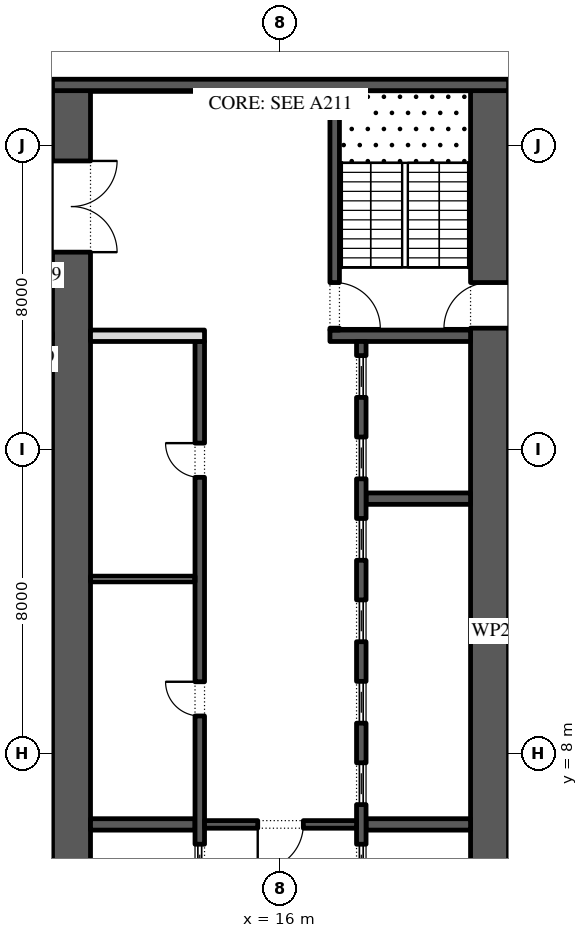
"""IFC4 building model, lengths in metres.
Left out: names, types, materials, properties, quantities, classifications, styles, units other than length and angle.
Written with IfcOpenShell. Run it as: python <this file> out.ifc"""

import sys

from ifc_helpers import new_model, si_unit, direction, frame, frame_2d, origin, place, context, subcontext, project, spatial, rectangle, extrude, element, fill, save


model = new_model("IFC4")
c1 = context("Model", 3, precision=1e-05, world=origin(), true_north=direction((0.0, 1.0)))
c2 = subcontext(c1, "Body", "Model", "MODEL_VIEW")
j1 = project(units=[si_unit("LENGTHUNIT", "METRE"), si_unit("PLANEANGLEUNIT", "RADIAN")], contexts=[c1])
p1 = place(None, origin())
s1 = spatial("IfcSite", under=j1, at=p1, CompositionType="ELEMENT")
p2 = place(p1, origin())
s2 = spatial("IfcBuilding", under=s1, at=p2, CompositionType="ELEMENT")
p3 = place(p2, frame((0.0, 0.0, 43.8)))
s3 = spatial("IfcBuildingStorey", under=s2, at=p3, CompositionType="ELEMENT", Elevation=43.8)
p4 = place(p3, frame((21.5, -2.45, 0.0), z_axis=(0.0, 0.0, 1.0), x_axis=(0.0, 1.0, 0.0)))
e1 = element("IfcWall", 1, at=p4, inside=s3, PredefinedType="SHEAR", context=c2, shape_type="SweptSolid", body=[
    extrude(rectangle(XDim=27.9, YDim=1.0, at=frame_2d((13.95, 0.0))), origin(), (0.0, 0.0, 1.0), 4.0),
])
p5 = place(p4, frame((5.05, 0.0, 0.0)))
e2 = element("IfcOpeningElement", 2, at=p5, cuts=e1, PredefinedType="OPENING", context=c2, shape_type="SweptSolid", body=[
    extrude(rectangle(XDim=1.2, YDim=2.1, at=frame_2d((0.6, 1.05))), frame((0.0, 0.51, 0.0), z_axis=(0.0, -1.0, 0.0), x_axis=(1.0, 0.0, 0.0)), (0.0, 0.0, 1.0), 1.02),
])
p6 = place(p4, frame((21.65, 0.0, 0.0)))
e3 = element("IfcOpeningElement", 3, at=p6, cuts=e1, PredefinedType="OPENING", context=c2, shape_type="SweptSolid", body=[
    extrude(rectangle(XDim=1.2, YDim=2.1, at=frame_2d((0.6, 1.05))), frame((0.0, 0.51, 0.0), z_axis=(0.0, -1.0, 0.0), x_axis=(1.0, 0.0, 0.0)), (0.0, 0.0, 1.0), 1.02),
])
p7 = place(p3, frame((10.5, -2.45, 0.0), z_axis=(0.0, 0.0, 1.0), x_axis=(0.0, 1.0, 0.0)))
e4 = element("IfcWall", 4, at=p7, inside=s3, PredefinedType="SHEAR", context=c2, shape_type="SweptSolid", body=[
    extrude(rectangle(XDim=27.9, YDim=1.0, at=frame_2d((13.95, 0.0))), origin(), (0.0, 0.0, 1.0), 4.0),
])
p8 = place(p7, frame((23.65, 0.0, 0.0)))
e5 = element("IfcOpeningElement", 5, at=p8, cuts=e4, PredefinedType="OPENING", context=c2, shape_type="SweptSolid", body=[
    extrude(rectangle(XDim=2.4, YDim=2.1, at=frame_2d((1.2, 1.05))), frame((0.0, 0.51, 0.0), z_axis=(0.0, -1.0, 0.0), x_axis=(1.0, 0.0, 0.0)), (0.0, 0.0, 1.0), 1.02),
])
p9 = place(p7, frame((1.387, 0.0, 0.0)))
e6 = element("IfcOpeningElement", 6, at=p9, cuts=e4, PredefinedType="OPENING", context=c2, shape_type="SweptSolid", body=[
    extrude(rectangle(XDim=0.9, YDim=2.1, at=frame_2d((0.45, 1.05))), frame((0.0, 0.51, 0.0), z_axis=(0.0, -1.0, 0.0), x_axis=(1.0, 0.0, 0.0)), (0.0, 0.0, 1.0), 1.02),
])
p10 = place(p7, frame((4.613, 0.0, 0.0)))
e7 = element("IfcOpeningElement", 7, at=p10, cuts=e4, PredefinedType="OPENING", context=c2, shape_type="SweptSolid", body=[
    extrude(rectangle(XDim=0.9, YDim=2.1, at=frame_2d((0.45, 1.05))), frame((0.0, 0.51, 0.0), z_axis=(0.0, -1.0, 0.0), x_axis=(1.0, 0.0, 0.0)), (0.0, 0.0, 1.0), 1.02),
])
p11 = place(p3, frame((10.0, 25.6, 0.0), z_axis=(0.0, 0.0, 1.0), x_axis=(1.0, 0.0, 0.0)))
e8 = element("IfcWall", 8, at=p11, inside=s3, PredefinedType="SHEAR", context=c2, shape_type="SweptSolid", body=[
    extrude(rectangle(XDim=12.0, YDim=0.3, at=frame_2d((6.0, 0.0))), origin(), (0.0, 0.0, 1.0), 4.0),
])
p12 = place(p3, frame((17.3, 19.0, 0.0), z_axis=(0.0, 0.0, 1.0), x_axis=(1.0, 0.0, 0.0)))
e9 = element("IfcWall", 9, at=p12, inside=s3, PredefinedType="SHEAR", context=c2, shape_type="SweptSolid", body=[
    extrude(rectangle(XDim=3.7, YDim=0.3, at=frame_2d((1.85, 0.0))), origin(), (0.0, 0.0, 1.0), 4.0),
])
p13 = place(p3, frame((17.425, 19.15, 0.0), z_axis=(0.0, 0.0, 1.0), x_axis=(0.0, 1.0, 0.0)))
e10 = element("IfcWall", 10, at=p13, inside=s3, PredefinedType="SHEAR", context=c2, shape_type="SweptSolid", body=[
    extrude(rectangle(XDim=6.3, YDim=0.25, at=frame_2d((3.15, 0.0))), origin(), (0.0, 0.0, 1.0), 4.0),
])
p14 = place(p13, frame((0.05, 0.0, 0.0)))
e11 = element("IfcOpeningElement", 11, at=p14, cuts=e10, PredefinedType="OPENING", context=c2, shape_type="SweptSolid", body=[
    extrude(rectangle(XDim=1.2, YDim=2.1, at=frame_2d((0.6, 1.05))), frame((0.0, 0.135, 0.0), z_axis=(0.0, -1.0, 0.0), x_axis=(1.0, 0.0, 0.0)), (0.0, 0.0, 1.0), 0.27),
])
for number, where, z_axis, x_axis in (
    (12, (18.25, 6.143, 0.0), (0.0, 0.0, 1.0), (1.0, 0.0, 0.0)),
    (13, (18.25, 14.714, 0.0), (0.0, 0.0, 1.0), (1.0, 0.0, 0.0)),
):
    element("IfcWall", number, at=place(p3, frame(where, z_axis=z_axis, x_axis=x_axis)), inside=s3, PredefinedType="SHEAR", context=c2, shape_type="SweptSolid", body=[
        extrude(rectangle(XDim=2.75, YDim=0.3, at=frame_2d((1.375, 0.0))), origin(), (0.0, 0.0, 1.0), 4.0),
    ])
p15 = place(p3, frame((18.125, 4.15, 0.0), z_axis=(0.0, 0.0, 1.0), x_axis=(0.0, 1.0, 0.0)))
e14 = element("IfcWall", 14, at=p15, inside=s3, PredefinedType="SHEAR", context=c2, shape_type="SweptSolid", body=[
    extrude(rectangle(XDim=14.7, YDim=0.25, at=frame_2d((7.35, 0.0))), origin(), (0.0, 0.0, 1.0), 4.0),
])
p16 = place(p15, frame((0.371, 0.0, 0.0)))
e15 = element("IfcOpeningElement", 15, at=p16, cuts=e14, PredefinedType="OPENING", context=c2, shape_type="SweptSolid", body=[
    extrude(rectangle(XDim=1.1, YDim=2.1, at=frame_2d((0.55, 1.05))), frame((0.0, 0.135, 0.0), z_axis=(0.0, -1.0, 0.0), x_axis=(1.0, 0.0, 0.0)), (0.0, 0.0, 1.0), 0.27),
])
p17 = place(p15, frame((2.514, 0.0, 0.0)))
e16 = element("IfcOpeningElement", 16, at=p17, cuts=e14, PredefinedType="OPENING", context=c2, shape_type="SweptSolid", body=[
    extrude(rectangle(XDim=1.1, YDim=2.1, at=frame_2d((0.55, 1.05))), frame((0.0, 0.135, 0.0), z_axis=(0.0, -1.0, 0.0), x_axis=(1.0, 0.0, 0.0)), (0.0, 0.0, 1.0), 0.27),
])
p18 = place(p15, frame((4.657, 0.0, 0.0)))
e17 = element("IfcOpeningElement", 17, at=p18, cuts=e14, PredefinedType="OPENING", context=c2, shape_type="SweptSolid", body=[
    extrude(rectangle(XDim=1.1, YDim=2.1, at=frame_2d((0.55, 1.05))), frame((0.0, 0.135, 0.0), z_axis=(0.0, -1.0, 0.0), x_axis=(1.0, 0.0, 0.0)), (0.0, 0.0, 1.0), 0.27),
])
p19 = place(p15, frame((6.8, 0.0, 0.0)))
e18 = element("IfcOpeningElement", 18, at=p19, cuts=e14, PredefinedType="OPENING", context=c2, shape_type="SweptSolid", body=[
    extrude(rectangle(XDim=1.1, YDim=2.1, at=frame_2d((0.55, 1.05))), frame((0.0, 0.135, 0.0), z_axis=(0.0, -1.0, 0.0), x_axis=(1.0, 0.0, 0.0)), (0.0, 0.0, 1.0), 0.27),
])
p20 = place(p15, frame((8.943, 0.0, 0.0)))
e19 = element("IfcOpeningElement", 19, at=p20, cuts=e14, PredefinedType="OPENING", context=c2, shape_type="SweptSolid", body=[
    extrude(rectangle(XDim=1.1, YDim=2.1, at=frame_2d((0.55, 1.05))), frame((0.0, 0.135, 0.0), z_axis=(0.0, -1.0, 0.0), x_axis=(1.0, 0.0, 0.0)), (0.0, 0.0, 1.0), 0.27),
])
p21 = place(p15, frame((11.086, 0.0, 0.0)))
e20 = element("IfcOpeningElement", 20, at=p21, cuts=e14, PredefinedType="OPENING", context=c2, shape_type="SweptSolid", body=[
    extrude(rectangle(XDim=1.1, YDim=2.1, at=frame_2d((0.55, 1.05))), frame((0.0, 0.135, 0.0), z_axis=(0.0, -1.0, 0.0), x_axis=(1.0, 0.0, 0.0)), (0.0, 0.0, 1.0), 0.27),
])
p22 = place(p15, frame((13.229, 0.0, 0.0)))
e21 = element("IfcOpeningElement", 21, at=p22, cuts=e14, PredefinedType="OPENING", context=c2, shape_type="SweptSolid", body=[
    extrude(rectangle(XDim=1.1, YDim=2.1, at=frame_2d((0.55, 1.05))), frame((0.0, 0.135, 0.0), z_axis=(0.0, -1.0, 0.0), x_axis=(1.0, 0.0, 0.0)), (0.0, 0.0, 1.0), 0.27),
])
p23 = place(p3, frame((11.0, 6.143, 0.0), z_axis=(0.0, 0.0, 1.0), x_axis=(1.0, 0.0, 0.0)))
e22 = element("IfcWall", 22, at=p23, inside=s3, PredefinedType="SHEAR", context=c2, shape_type="SweptSolid", body=[
    extrude(rectangle(XDim=2.75, YDim=0.3, at=frame_2d((1.375, 0.0))), origin(), (0.0, 0.0, 1.0), 4.0),
])
p24 = place(p3, frame((13.875, -2.45, 0.0), z_axis=(0.0, 0.0, 1.0), x_axis=(0.0, 1.0, 0.0)))
e23 = element("IfcWall", 23, at=p24, inside=s3, PredefinedType="SHEAR", context=c2, shape_type="SweptSolid", body=[
    extrude(rectangle(XDim=21.3, YDim=0.25, at=frame_2d((10.65, 0.0))), origin(), (0.0, 0.0, 1.0), 4.0),
])
p25 = place(p24, frame((11.446, 0.0, 0.0)))
e24 = element("IfcOpeningElement", 24, at=p25, cuts=e23, PredefinedType="OPENING", context=c2, shape_type="SweptSolid", body=[
    extrude(rectangle(XDim=0.9, YDim=2.1, at=frame_2d((0.45, 1.05))), frame((0.0, 0.135, 0.0), z_axis=(0.0, -1.0, 0.0), x_axis=(1.0, 0.0, 0.0)), (0.0, 0.0, 1.0), 0.27),
])
p26 = place(p24, frame((17.725, 0.0, 0.0)))
e25 = element("IfcOpeningElement", 25, at=p26, cuts=e23, PredefinedType="OPENING", context=c2, shape_type="SweptSolid", body=[
    extrude(rectangle(XDim=0.9, YDim=2.1, at=frame_2d((0.45, 1.05))), frame((0.0, 0.135, 0.0), z_axis=(0.0, -1.0, 0.0), x_axis=(1.0, 0.0, 0.0)), (0.0, 0.0, 1.0), 0.27),
])
p27 = place(p24, frame((6.971, 0.0, 0.0)))
e26 = element("IfcOpeningElement", 26, at=p27, cuts=e23, PredefinedType="OPENING", context=c2, shape_type="SweptSolid", body=[
    extrude(rectangle(XDim=1.1, YDim=2.1, at=frame_2d((0.55, 1.05))), frame((0.0, 0.135, 0.0), z_axis=(0.0, -1.0, 0.0), x_axis=(1.0, 0.0, 0.0)), (0.0, 0.0, 1.0), 0.27),
])
p28 = place(p3, frame((11.0, 19.0, 0.0), z_axis=(0.0, 0.0, 1.0), x_axis=(1.0, 0.0, 0.0)))
e27 = element("IfcWall", 27, at=p28, inside=s3, PredefinedType="PARTITIONING", context=c2, shape_type="SweptSolid", body=[
    extrude(rectangle(XDim=3.0, YDim=0.3, at=frame_2d((1.5, 0.0))), origin(), (0.0, 0.0, 1.0), 4.0),
])
p29 = place(p3, frame((11.0, 12.6, 0.0), z_axis=(0.0, 0.0, 1.0), x_axis=(1.0, 0.0, 0.0)))
e28 = element("IfcWall", 28, at=p29, inside=s3, PredefinedType="PARTITIONING", context=c2, shape_type="SweptSolid", body=[
    extrude(rectangle(XDim=2.75, YDim=0.15, at=frame_2d((1.375, 0.0))), origin(), (0.0, 0.0, 1.0), 4.0),
])
p30 = place(p3, frame((14.0, 6.143, 0.0), z_axis=(0.0, 0.0, 1.0), x_axis=(1.0, 0.0, 0.0)))
e29 = element("IfcWall", 29, at=p30, inside=s3, PredefinedType="SHEAR", context=c2, shape_type="SweptSolid", body=[
    extrude(rectangle(XDim=4.0, YDim=0.2, at=frame_2d((2.0, 0.0))), origin(), (0.0, 0.0, 1.0), 4.0),
])
p31 = place(p30, frame((1.4, 0.0, 0.0)))
e30 = element("IfcOpeningElement", 30, at=p31, cuts=e29, PredefinedType="OPENING", context=c2, shape_type="SweptSolid", body=[
    extrude(rectangle(XDim=1.2, YDim=2.1, at=frame_2d((0.6, 1.05))), frame((0.0, 0.11, 0.0), z_axis=(0.0, -1.0, 0.0), x_axis=(1.0, 0.0, 0.0)), (0.0, 0.0, 1.0), 0.22),
])
p32 = place(p16, origin())
e31 = element("IfcDoor", 31, at=p32, inside=s3, OperationType="SLIDING_TO_LEFT", PredefinedType="DOOR", context=c2, shape_type="SweptSolid", body=[
    extrude(rectangle(XDim=1.1, YDim=2.1, at=frame_2d((0.55, 1.05))), frame((0.0, 0.025, 0.0), z_axis=(0.0, -1.0, 0.0), x_axis=(1.0, 0.0, 0.0)), (0.0, 0.0, 1.0), 0.05),
])
fill(e15, e31)
p33 = place(p17, origin())
e32 = element("IfcDoor", 32, at=p33, inside=s3, OperationType="SLIDING_TO_LEFT", PredefinedType="DOOR", context=c2, shape_type="SweptSolid", body=[
    extrude(rectangle(XDim=1.1, YDim=2.1, at=frame_2d((0.55, 1.05))), frame((0.0, 0.025, 0.0), z_axis=(0.0, -1.0, 0.0), x_axis=(1.0, 0.0, 0.0)), (0.0, 0.0, 1.0), 0.05),
])
fill(e16, e32)
p34 = place(p18, origin())
e33 = element("IfcDoor", 33, at=p34, inside=s3, OperationType="SLIDING_TO_LEFT", PredefinedType="DOOR", context=c2, shape_type="SweptSolid", body=[
    extrude(rectangle(XDim=1.1, YDim=2.1, at=frame_2d((0.55, 1.05))), frame((0.0, 0.025, 0.0), z_axis=(0.0, -1.0, 0.0), x_axis=(1.0, 0.0, 0.0)), (0.0, 0.0, 1.0), 0.05),
])
fill(e17, e33)
p35 = place(p19, origin())
e34 = element("IfcDoor", 34, at=p35, inside=s3, OperationType="SLIDING_TO_LEFT", PredefinedType="DOOR", context=c2, shape_type="SweptSolid", body=[
    extrude(rectangle(XDim=1.1, YDim=2.1, at=frame_2d((0.55, 1.05))), frame((0.0, 0.025, 0.0), z_axis=(0.0, -1.0, 0.0), x_axis=(1.0, 0.0, 0.0)), (0.0, 0.0, 1.0), 0.05),
])
fill(e18, e34)
p36 = place(p20, origin())
e35 = element("IfcDoor", 35, at=p36, inside=s3, OperationType="SLIDING_TO_LEFT", PredefinedType="DOOR", context=c2, shape_type="SweptSolid", body=[
    extrude(rectangle(XDim=1.1, YDim=2.1, at=frame_2d((0.55, 1.05))), frame((0.0, 0.025, 0.0), z_axis=(0.0, -1.0, 0.0), x_axis=(1.0, 0.0, 0.0)), (0.0, 0.0, 1.0), 0.05),
])
fill(e19, e35)
p37 = place(p21, origin())
e36 = element("IfcDoor", 36, at=p37, inside=s3, OperationType="SLIDING_TO_LEFT", PredefinedType="DOOR", context=c2, shape_type="SweptSolid", body=[
    extrude(rectangle(XDim=1.1, YDim=2.1, at=frame_2d((0.55, 1.05))), frame((0.0, 0.025, 0.0), z_axis=(0.0, -1.0, 0.0), x_axis=(1.0, 0.0, 0.0)), (0.0, 0.0, 1.0), 0.05),
])
fill(e20, e36)
p38 = place(p22, origin())
e37 = element("IfcDoor", 37, at=p38, inside=s3, OperationType="SLIDING_TO_LEFT", PredefinedType="DOOR", context=c2, shape_type="SweptSolid", body=[
    extrude(rectangle(XDim=1.1, YDim=2.1, at=frame_2d((0.55, 1.05))), frame((0.0, 0.025, 0.0), z_axis=(0.0, -1.0, 0.0), x_axis=(1.0, 0.0, 0.0)), (0.0, 0.0, 1.0), 0.05),
])
fill(e21, e37)
p39 = place(p25, origin())
e38 = element("IfcDoor", 38, at=p39, inside=s3, OperationType="SINGLE_SWING_LEFT", PredefinedType="DOOR", context=c2, shape_type="SweptSolid", body=[
    extrude(rectangle(XDim=0.9, YDim=2.1, at=frame_2d((0.45, 1.05))), frame((0.0, 0.125, 0.0), z_axis=(0.0, -1.0, 0.0), x_axis=(1.0, 0.0, 0.0)), (0.0, 0.0, 1.0), 0.05),
])
fill(e24, e38)
p40 = place(p26, origin())
e39 = element("IfcDoor", 39, at=p40, inside=s3, OperationType="SINGLE_SWING_LEFT", PredefinedType="DOOR", context=c2, shape_type="SweptSolid", body=[
    extrude(rectangle(XDim=0.9, YDim=2.1, at=frame_2d((0.45, 1.05))), frame((0.0, 0.125, 0.0), z_axis=(0.0, -1.0, 0.0), x_axis=(1.0, 0.0, 0.0)), (0.0, 0.0, 1.0), 0.05),
])
fill(e25, e39)
p41 = place(p27, origin())
e40 = element("IfcDoor", 40, at=p41, inside=s3, OperationType="SLIDING_TO_LEFT", PredefinedType="DOOR", context=c2, shape_type="SweptSolid", body=[
    extrude(rectangle(XDim=1.1, YDim=2.1, at=frame_2d((0.55, 1.05))), frame((0.0, 0.025, 0.0), z_axis=(0.0, -1.0, 0.0), x_axis=(1.0, 0.0, 0.0)), (0.0, 0.0, 1.0), 0.05),
])
fill(e26, e40)
p42 = place(p31, frame((1.2, 0.0, 0.0), z_axis=(0.0, 0.0, 1.0), x_axis=(-1.0, 0.0, 0.0)))
e41 = element("IfcDoor", 41, at=p42, inside=s3, OperationType="SINGLE_SWING_LEFT", PredefinedType="DOOR", context=c2, shape_type="SweptSolid", body=[
    extrude(rectangle(XDim=1.2, YDim=2.1, at=frame_2d((0.6, 1.05))), frame((0.0, 0.025, 0.0), z_axis=(0.0, -1.0, 0.0), x_axis=(1.0, 0.0, 0.0)), (0.0, 0.0, 1.0), 0.05),
])
fill(e30, e41)
p43 = place(p8, frame((2.4, 0.0, 0.0), z_axis=(0.0, 0.0, 1.0), x_axis=(-1.0, 0.0, 0.0)))
e42 = element("IfcDoor", 42, at=p43, inside=s3, OperationType="DOUBLE_DOOR_SINGLE_SWING", PredefinedType="DOOR", context=c2, shape_type="SweptSolid", body=[
    extrude(rectangle(XDim=2.4, YDim=2.1, at=frame_2d((1.2, 1.05))), frame((0.0, 0.025, 0.0), z_axis=(0.0, -1.0, 0.0), x_axis=(1.0, 0.0, 0.0)), (0.0, 0.0, 1.0), 0.05),
])
fill(e5, e42)
p44 = place(p14, frame((1.2, 0.0, 0.0), z_axis=(0.0, 0.0, 1.0), x_axis=(-1.0, 0.0, 0.0)))
e43 = element("IfcDoor", 43, at=p44, inside=s3, OperationType="SINGLE_SWING_LEFT", PredefinedType="DOOR", context=c2, shape_type="SweptSolid", body=[
    extrude(rectangle(XDim=1.2, YDim=2.1, at=frame_2d((0.6, 1.05))), frame((0.0, 0.025, 0.0), z_axis=(0.0, -1.0, 0.0), x_axis=(1.0, 0.0, 0.0)), (0.0, 0.0, 1.0), 0.05),
])
fill(e11, e43)
p45 = place(p6, origin())
e44 = element("IfcDoor", 44, at=p45, inside=s3, OperationType="SINGLE_SWING_RIGHT", PredefinedType="DOOR", context=c2, shape_type="SweptSolid", body=[
    extrude(rectangle(XDim=1.2, YDim=2.1, at=frame_2d((0.6, 1.05))), frame((0.0, 0.025, 0.0), z_axis=(0.0, -1.0, 0.0), x_axis=(1.0, 0.0, 0.0)), (0.0, 0.0, 1.0), 0.05),
])
fill(e3, e44)
save(model, sys.argv[1])
